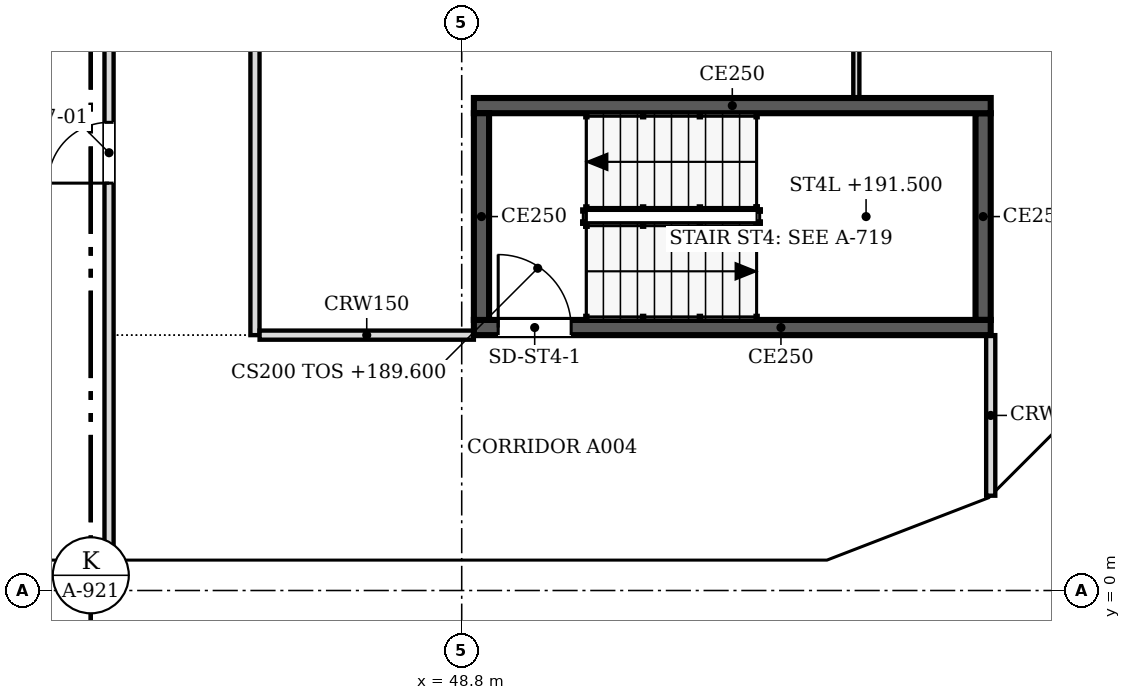
"""IFC4 building model, lengths in metres.
Left out: names, types, materials, properties, quantities, classifications, styles, units other than length and angle.
Written with IfcOpenShell. Run it as: python <this file> out.ifc"""

import sys

from ifc_helpers import new_model, si_unit, direction, frame, frame_2d, origin, place, context, subcontext, project, spatial, polyline, rectangle, outline, extrude, faceted_brep, source, transform, mapped, element, fill, save


model = new_model("IFC4")
c1 = context("Model", 3, precision=1e-05, world=origin(), true_north=direction((0.0, 1.0)))
c2 = subcontext(c1, "Body", "Model", "MODEL_VIEW")
j1 = project(units=[si_unit("LENGTHUNIT", "METRE"), si_unit("PLANEANGLEUNIT", "RADIAN")], contexts=[c1])
p1 = place(None, origin())
s1 = spatial("IfcSite", under=j1, at=p1, CompositionType="ELEMENT")
p2 = place(p1, origin())
s2 = spatial("IfcBuilding", under=s1, at=p2, CompositionType="ELEMENT")
p3 = place(p2, frame((0.0, 0.0, 189.6)))
s3 = spatial("IfcBuildingStorey", under=s2, at=p3, CompositionType="ELEMENT", Elevation=189.6)
m1 = source(origin(), c2, "Body", "Brep", [
    faceted_brep([(3.05, -0.25, 0.0), (6.1, -0.25, 3.8), (6.1, -0.25, 3.8), (3.05, -0.25, 7.6), (0.0, -0.25, 3.8), (0.0, 0.25, 3.8), (3.05, 0.25, 7.6), (6.1, 0.25, 3.8), (6.1, 0.25, 3.8), (3.05, 0.25, 0.0)], [[[0, 1, 2, 3, 4]], [[5, 6, 7, 8, 9]], [[9, 8, 1, 0]], [[7, 6, 3, 2]], [[6, 5, 4, 3]], [[5, 9, 0, 4]], [[1, 8, 7, 2]]]),
])
p4 = place(p3, frame((36.6, 0.25, -3.8), z_axis=(0.0, 0.0, 1.0), x_axis=(1.0, 0.0, 0.0)))
e1 = element("IfcWall", 1, at=p4, inside=s3, PredefinedType="SOLIDWALL", context=c2, shape_type="MappedRepresentation", body=[
    mapped(m1, transform((0.0, 0.0, 0.0), scale=1.0)),
])
m2 = source(origin(), c2, "Body", "SweptSolid", [
    extrude(outline(polyline([(3.05, 0.399), (5.78, 3.8), (3.05, 7.2), (0.321, 3.8), (3.05, 0.399)])), frame((0.0, 0.26, 0.0), z_axis=(0.0, -1.0, 0.0), x_axis=(1.0, 0.0, 0.0)), (0.0, 0.0, 1.0), 0.52),
])
p5 = place(p4, origin())
e2 = element("IfcOpeningElement", 2, at=p5, cuts=e1, PredefinedType="OPENING", context=c2, shape_type="MappedRepresentation", body=[
    mapped(m2, transform((0.0, 0.0, 0.0), scale=1.0)),
])
m3 = source(origin(), c2, "Body", "SweptSolid", [
    extrude(outline(polyline([(3.05, 0.0), (6.1, 3.8), (3.05, 7.6), (0.0, 3.8), (3.05, 0.0)])), frame((0.0, 0.25, 0.0), z_axis=(0.0, -1.0, 0.0), x_axis=(1.0, 0.0, 0.0)), (0.0, 0.0, 1.0), 0.5),
])
p6 = place(p3, frame((42.7, 0.25, -3.8), z_axis=(0.0, 0.0, 1.0), x_axis=(1.0, 0.0, 0.0)))
e3 = element("IfcWall", 3, at=p6, inside=s3, PredefinedType="SOLIDWALL", context=c2, shape_type="MappedRepresentation", body=[
    mapped(m3, transform((0.0, 0.0, 0.0), scale=1.0)),
])
p7 = place(p6, origin())
e4 = element("IfcOpeningElement", 4, at=p7, cuts=e3, PredefinedType="OPENING", context=c2, shape_type="MappedRepresentation", body=[
    mapped(m2, transform((0.0, 0.0, 0.0), scale=1.0)),
])
m4 = source(origin(), c2, "Body", "Brep", [
    faceted_brep([(3.05, -0.25, 0.0), (6.053, -0.25, 3.8), (3.05, -0.25, 7.6), (0.0, -0.25, 3.8), (0.0, 0.25, 3.8), (3.05, 0.25, 7.6), (6.007, 0.25, 3.859), (6.007, 0.25, 3.741), (3.05, 0.25, 0.0), (6.053, 0.0, 3.8)], [[[0, 1, 2, 3]], [[4, 5, 6, 7, 8]], [[8, 7, 9, 1, 0]], [[6, 5, 2, 1, 9]], [[5, 4, 3, 2]], [[4, 8, 0, 3]], [[7, 6, 9]]]),
])
p8 = place(p3, frame((48.8, 0.25, -3.8), z_axis=(0.0, 0.0, 1.0), x_axis=(1.0, 0.0, 0.0)))
e5 = element("IfcWall", 5, at=p8, inside=s3, PredefinedType="SOLIDWALL", context=c2, shape_type="MappedRepresentation", body=[
    mapped(m4, transform((0.0, 0.0, 0.0), scale=1.0)),
])
m5 = source(origin(), c2, "Body", "SweptSolid", [
    extrude(outline(polyline([(3.049, 0.401), (5.735, 3.8), (3.049, 7.199), (0.321, 3.8), (3.049, 0.401)])), frame((0.0, 0.26, 0.0), z_axis=(0.0, -1.0, 0.0), x_axis=(1.0, 0.0, 0.0)), (0.0, 0.0, 1.0), 0.52),
])
p9 = place(p8, origin())
e6 = element("IfcOpeningElement", 6, at=p9, cuts=e5, PredefinedType="OPENING", context=c2, shape_type="MappedRepresentation", body=[
    mapped(m5, transform((0.0, 0.0, 0.0), scale=1.0)),
])
m6 = source(origin(), c2, "Body", "Brep", [
    faceted_brep([(2.95, -0.25, 0.0), (3.003, -0.25, 0.068), (3.003, -0.25, 7.531), (2.95, -0.25, 7.6), (0.0, -0.25, 3.8), (0.047, 0.25, 3.86), (2.898, 0.25, 7.532), (2.898, 0.25, 0.068), (0.047, 0.25, 3.74), (2.95, 0.0, 0.0), (2.95, 0.0, 7.6), (0.0, 0.0, 3.8)], [[[0, 1, 2, 3, 4]], [[5, 6, 7, 8]], [[1, 0, 9]], [[10, 3, 2]], [[6, 5, 11, 4, 3, 10]], [[8, 7, 9, 0, 4, 11]], [[8, 11, 5]], [[1, 9, 7, 6, 10, 2]]]),
])
p10 = place(p3, frame((54.854, 0.25, -3.8), z_axis=(0.0, 0.0, 1.0), x_axis=(0.932970071518, 0.359953949349, 0.0)))
e7 = element("IfcWall", 7, at=p10, inside=s3, PredefinedType="SOLIDWALL", context=c2, shape_type="MappedRepresentation", body=[
    mapped(m6, transform((0.0, 0.0, 0.0), scale=1.0)),
])
m7 = source(origin(), c2, "Body", "SweptSolid", [
    extrude(outline(polyline([(2.75, 6.935), (0.316, 3.8), (2.75, 0.665), (2.75, 6.935)])), frame((0.0, 0.26, 0.0), z_axis=(0.0, -1.0, 0.0), x_axis=(1.0, 0.0, 0.0)), (0.0, 0.0, 1.0), 0.52),
])
p11 = place(p10, origin())
e8 = element("IfcOpeningElement", 8, at=p11, cuts=e7, PredefinedType="OPENING", context=c2, shape_type="MappedRepresentation", body=[
    mapped(m7, transform((0.0, 0.0, 0.0), scale=1.0)),
])
m8 = source(origin(), c2, "Body", "Brep", [
    faceted_brep([(0.053, -0.25, 0.0), (2.997, -0.25, 3.8), (0.053, -0.25, 7.6), (0.0, -0.25, 7.532), (0.0, -0.25, 0.068), (0.106, 0.25, 7.531), (2.944, 0.25, 3.868), (2.944, 0.25, 3.732), (0.106, 0.25, 0.068), (2.997, 0.0, 3.8), (0.053, 0.0, 0.0), (0.053, 0.0, 7.6)], [[[0, 1, 2, 3, 4]], [[5, 6, 7, 8]], [[8, 7, 9, 1, 0, 10]], [[6, 5, 11, 2, 1, 9]], [[3, 2, 11]], [[10, 0, 4]], [[8, 10, 4, 3, 11, 5]], [[7, 6, 9]]]),
])
p12 = place(p3, frame((57.569, 1.274, -3.8), z_axis=(0.0, 0.0, 1.0), x_axis=(0.707066050402, 0.707147509625, 0.0)))
e9 = element("IfcWall", 9, at=p12, inside=s3, PredefinedType="SOLIDWALL", context=c2, shape_type="MappedRepresentation", body=[
    mapped(m8, transform((0.0, 0.0, 0.0), scale=1.0)),
])
m9 = source(origin(), c2, "Body", "SweptSolid", [
    extrude(outline(polyline([(0.253, 0.666), (2.681, 3.8), (0.253, 6.934), (0.253, 0.666)])), frame((0.0, 0.26, 0.0), z_axis=(0.0, -1.0, 0.0), x_axis=(1.0, 0.0, 0.0)), (0.0, 0.0, 1.0), 0.52),
])
p13 = place(p12, origin())
e10 = element("IfcOpeningElement", 10, at=p13, cuts=e9, PredefinedType="OPENING", context=c2, shape_type="MappedRepresentation", body=[
    mapped(m9, transform((0.0, 0.0, 0.0), scale=1.0)),
])
m10 = source(origin(), c2, "Body", "SweptSolid", [
    extrude(outline(polyline([(3.05, 0.0), (6.1, 3.8), (0.0, 3.8), (3.05, 0.0)])), frame((0.0, 0.25, 0.0), z_axis=(0.0, -1.0, 0.0), x_axis=(1.0, 0.0, 0.0)), (0.0, 0.0, 1.0), 0.5),
])
p14 = place(p3, frame((39.65, 0.25, 0.0), z_axis=(0.0, 0.0, 1.0), x_axis=(1.0, 0.0, 0.0)))
e11 = element("IfcWall", 11, at=p14, inside=s3, PredefinedType="SOLIDWALL", context=c2, shape_type="MappedRepresentation", body=[
    mapped(m10, transform((0.0, 0.0, 0.0), scale=1.0)),
])
m11 = source(origin(), c2, "Body", "SweptSolid", [
    extrude(outline(polyline([(3.05, 0.399), (5.579, 3.55), (0.521, 3.55), (3.05, 0.399)])), frame((0.0, 0.26, 0.0), z_axis=(0.0, -1.0, 0.0), x_axis=(1.0, 0.0, 0.0)), (0.0, 0.0, 1.0), 0.52),
])
p15 = place(p14, origin())
e12 = element("IfcOpeningElement", 12, at=p15, cuts=e11, PredefinedType="OPENING", context=c2, shape_type="MappedRepresentation", body=[
    mapped(m11, transform((0.0, 0.0, 0.0), scale=1.0)),
])
p16 = place(p3, frame((45.75, 0.25, 0.0), z_axis=(0.0, 0.0, 1.0), x_axis=(1.0, 0.0, 0.0)))
e13 = element("IfcWall", 13, at=p16, inside=s3, PredefinedType="SOLIDWALL", context=c2, shape_type="MappedRepresentation", body=[
    mapped(m10, transform((0.0, 0.0, 0.0), scale=1.0)),
])
p17 = place(p16, origin())
e14 = element("IfcOpeningElement", 14, at=p17, cuts=e13, PredefinedType="OPENING", context=c2, shape_type="MappedRepresentation", body=[
    mapped(m11, transform((0.0, 0.0, 0.0), scale=1.0)),
])
m12 = source(origin(), c2, "Body", "Brep", [
    faceted_brep([(3.003, -0.25, 0.0), (3.05, -0.25, 0.06), (3.05, -0.25, 3.8), (0.0, -0.25, 3.8), (0.0, 0.25, 3.8), (2.957, 0.25, 3.8), (2.957, 0.25, 0.059), (3.003, 0.0, 0.0)], [[[0, 1, 2, 3]], [[4, 5, 6]], [[1, 0, 7]], [[5, 4, 3, 2]], [[4, 6, 7, 0, 3]], [[1, 7, 6, 5, 2]]]),
])
p18 = place(p3, frame((51.85, 0.25, 0.0), z_axis=(0.0, 0.0, 1.0), x_axis=(1.0, 0.0, 0.0)))
e15 = element("IfcWall", 15, at=p18, inside=s3, PredefinedType="SOLIDWALL", context=c2, shape_type="MappedRepresentation", body=[
    mapped(m12, transform((0.0, 0.0, 0.0), scale=1.0)),
])
m13 = source(origin(), c2, "Body", "SweptSolid", [
    extrude(outline(polyline([(2.803, 3.55), (0.516, 3.55), (2.803, 0.656), (2.803, 3.55)])), frame((0.0, 0.26, 0.0), z_axis=(0.0, -1.0, 0.0), x_axis=(1.0, 0.0, 0.0)), (0.0, 0.0, 1.0), 0.52),
])
p19 = place(p18, origin())
e16 = element("IfcOpeningElement", 16, at=p19, cuts=e15, PredefinedType="OPENING", context=c2, shape_type="MappedRepresentation", body=[
    mapped(m13, transform((0.0, 0.0, 0.0), scale=1.0)),
])
m14 = source(origin(), c2, "Body", "Brep", [
    faceted_brep([(0.047, -0.25, 0.0), (2.997, -0.25, 3.8), (0.0, -0.25, 3.8), (0.0, -0.25, 0.059), (0.093, 0.25, 3.8), (2.944, 0.25, 3.8), (2.944, 0.25, 3.732), (0.093, 0.25, 0.06), (2.997, 0.0, 3.8), (0.047, 0.0, 0.0)], [[[0, 1, 2, 3]], [[4, 5, 6, 7]], [[7, 6, 8, 1, 0, 9]], [[5, 4, 2, 1, 8]], [[9, 0, 3]], [[7, 9, 3, 2, 4]], [[6, 5, 8]]]),
])
p20 = place(p3, frame((54.81, 0.233, 0.0), z_axis=(0.0, 0.0, 1.0), x_axis=(0.932990326376, 0.359901446078, 0.0)))
e17 = element("IfcWall", 17, at=p20, inside=s3, PredefinedType="SOLIDWALL", context=c2, shape_type="MappedRepresentation", body=[
    mapped(m14, transform((0.0, 0.0, 0.0), scale=1.0)),
])
m15 = source(origin(), c2, "Body", "SweptSolid", [
    extrude(outline(polyline([(0.247, 0.665), (2.487, 3.55), (0.247, 3.55), (0.247, 0.665)])), frame((0.0, 0.26, 0.0), z_axis=(0.0, -1.0, 0.0), x_axis=(1.0, 0.0, 0.0)), (0.0, 0.0, 1.0), 0.52),
])
p21 = place(p20, origin())
e18 = element("IfcOpeningElement", 18, at=p21, cuts=e17, PredefinedType="OPENING", context=c2, shape_type="MappedRepresentation", body=[
    mapped(m15, transform((0.0, 0.0, 0.0), scale=1.0)),
])
m16 = source(origin(), c2, "Body", "Brep", [
    faceted_brep([(2.944, -0.25, 0.0), (2.997, -0.25, 0.068), (2.997, -0.25, 3.8), (0.0, -0.25, 3.8), (0.053, 0.25, 3.8), (2.891, 0.25, 3.8), (2.891, 0.25, 0.068), (0.053, 0.25, 3.731), (2.944, 0.0, 0.0), (0.0, 0.0, 3.8)], [[[0, 1, 2, 3]], [[4, 5, 6, 7]], [[1, 0, 8]], [[5, 4, 9, 3, 2]], [[7, 6, 8, 0, 3, 9]], [[7, 9, 4]], [[1, 8, 6, 5, 2]]]),
])
p22 = place(p3, frame((57.606, 1.312, 0.0), z_axis=(0.0, 0.0, 1.0), x_axis=(0.707147509625, 0.707066050402, 0.0)))
e19 = element("IfcWall", 19, at=p22, inside=s3, PredefinedType="SOLIDWALL", context=c2, shape_type="MappedRepresentation", body=[
    mapped(m16, transform((0.0, 0.0, 0.0), scale=1.0)),
])
m17 = source(origin(), c2, "Body", "SweptSolid", [
    extrude(outline(polyline([(2.744, 3.55), (0.51, 3.55), (2.744, 0.666), (2.744, 3.55)])), frame((0.0, 0.26, 0.0), z_axis=(0.0, -1.0, 0.0), x_axis=(1.0, 0.0, 0.0)), (0.0, 0.0, 1.0), 0.52),
])
p23 = place(p22, origin())
e20 = element("IfcOpeningElement", 20, at=p23, cuts=e19, PredefinedType="OPENING", context=c2, shape_type="MappedRepresentation", body=[
    mapped(m17, transform((0.0, 0.0, 0.0), scale=1.0)),
])
p24 = place(p3, frame((57.5, 4.325, 0.0), z_axis=(0.0, 0.0, 1.0), x_axis=(-1.0, 0.0, 0.0)))
e21 = element("IfcWall", 21, at=p24, inside=s3, PredefinedType="SOLIDWALL", context=c2, shape_type="SweptSolid", body=[
    extrude(rectangle(XDim=8.5, YDim=0.25, at=frame_2d((4.25, 0.0))), origin(), (0.0, 0.0, 1.0), 3.8),
])
m18 = source(origin(), c2, "Body", "SweptSolid", [
    extrude(rectangle(XDim=1.2, YDim=2.1, at=frame_2d((0.6, 1.05))), frame((0.0, 0.135, 0.0), z_axis=(0.0, -1.0, 0.0), x_axis=(1.0, 0.0, 0.0)), (0.0, 0.0, 1.0), 0.27),
])
p25 = place(p24, frame((6.9, 0.0, 0.0)))
e22 = element("IfcOpeningElement", 22, at=p25, cuts=e21, PredefinedType="OPENING", context=c2, shape_type="MappedRepresentation", body=[
    mapped(m18, transform((0.0, 0.0, 0.0), scale=1.0)),
])
p26 = place(p3, frame((49.125, 4.45, 0.0), z_axis=(0.0, 0.0, 1.0), x_axis=(0.0, 1.0, 0.0)))
e23 = element("IfcWall", 23, at=p26, inside=s3, PredefinedType="SOLIDWALL", context=c2, shape_type="SweptSolid", body=[
    extrude(rectangle(XDim=3.4, YDim=0.25, at=frame_2d((1.7, 0.0))), origin(), (0.0, 0.0, 1.0), 3.8),
])
p27 = place(p3, frame((49.0, 7.975, 0.0), z_axis=(0.0, 0.0, 1.0), x_axis=(1.0, 0.0, 0.0)))
e24 = element("IfcWall", 24, at=p27, inside=s3, PredefinedType="SOLIDWALL", context=c2, shape_type="SweptSolid", body=[
    extrude(rectangle(XDim=8.5, YDim=0.25, at=frame_2d((4.25, 0.0))), origin(), (0.0, 0.0, 1.0), 3.8),
])
p28 = place(p3, frame((57.375, 7.85, 0.0), z_axis=(0.0, 0.0, 1.0), x_axis=(0.0, -1.0, 0.0)))
e25 = element("IfcWall", 25, at=p28, inside=s3, PredefinedType="SOLIDWALL", context=c2, shape_type="SweptSolid", body=[
    extrude(rectangle(XDim=3.4, YDim=0.25, at=frame_2d((1.7, 0.0))), origin(), (0.0, 0.0, 1.0), 3.8),
])
p29 = place(p3, frame((43.0, 0.5, 0.0), z_axis=(0.0, 0.0, 1.0), x_axis=(0.0, 1.0, 0.0)))
e26 = element("IfcWall", 26, at=p29, inside=s3, PredefinedType="PARTITIONING", context=c2, shape_type="SweptSolid", body=[
    extrude(rectangle(XDim=21.424, YDim=0.15, at=frame_2d((10.712, 0.0))), origin(), (0.0, 0.0, 1.0), 2.947),
])
m19 = source(origin(), c2, "Body", "SweptSolid", [
    extrude(rectangle(XDim=1.0, YDim=2.1, at=frame_2d((0.5, 1.05))), frame((0.0, 0.085, 0.0), z_axis=(0.0, -1.0, 0.0), x_axis=(1.0, 0.0, 0.0)), (0.0, 0.0, 1.0), 0.17),
])
p30 = place(p29, frame((6.2, 0.0, 0.0)))
e27 = element("IfcOpeningElement", 27, at=p30, cuts=e26, PredefinedType="OPENING", context=c2, shape_type="MappedRepresentation", body=[
    mapped(m19, transform((0.0, 0.0, 0.0), scale=1.0)),
])
p31 = place(p29, frame((15.1, 0.0, 0.0)))
e28 = element("IfcOpeningElement", 28, at=p31, cuts=e26, PredefinedType="OPENING", context=c2, shape_type="MappedRepresentation", body=[
    mapped(m19, transform((0.0, 0.0, 0.0), scale=1.0)),
])
p32 = place(p3, frame((57.5, 1.559, 0.0), z_axis=(0.0, 0.0, 1.0), x_axis=(0.0, 1.0, 0.0)))
e29 = element("IfcWall", 29, at=p32, inside=s3, PredefinedType="PARTITIONING", context=c2, shape_type="SweptSolid", body=[
    extrude(rectangle(XDim=2.641, YDim=0.15, at=frame_2d((1.32, 0.0))), origin(), (0.0, 0.0, 1.0), 2.947),
])
p33 = place(p3, frame((45.4, 21.924, 0.0), z_axis=(0.0, 0.0, 1.0), x_axis=(0.0, -1.0, 0.0)))
e30 = element("IfcWall", 30, at=p33, inside=s3, PredefinedType="PARTITIONING", context=c2, shape_type="SweptSolid", body=[
    extrude(rectangle(XDim=17.724, YDim=0.15, at=frame_2d((8.862, 0.0))), origin(), (0.0, 0.0, 1.0), 2.947),
])
m20 = source(origin(), c2, "Body", "SweptSolid", [
    extrude(rectangle(XDim=0.9, YDim=2.1, at=frame_2d((0.45, 1.05))), frame((0.0, 0.085, 0.0), z_axis=(0.0, -1.0, 0.0), x_axis=(1.0, 0.0, 0.0)), (0.0, 0.0, 1.0), 0.17),
])
p34 = place(p33, frame((1.923, 0.0, 0.0)))
e31 = element("IfcOpeningElement", 31, at=p34, cuts=e30, PredefinedType="OPENING", context=c2, shape_type="MappedRepresentation", body=[
    mapped(m20, transform((0.0, 0.0, 0.0), scale=1.0)),
])
p35 = place(p33, frame((10.824, 0.0, 0.0)))
e32 = element("IfcOpeningElement", 32, at=p35, cuts=e30, PredefinedType="OPENING", context=c2, shape_type="MappedRepresentation", body=[
    mapped(m20, transform((0.0, 0.0, 0.0), scale=1.0)),
])
p36 = place(p3, frame((45.476, 4.2, 0.0), z_axis=(0.0, 0.0, 1.0), x_axis=(1.0, 0.0, 0.0)))
e33 = element("IfcWall", 33, at=p36, inside=s3, PredefinedType="PARTITIONING", context=c2, shape_type="SweptSolid", body=[
    extrude(rectangle(XDim=3.524, YDim=0.15, at=frame_2d((1.762, 0.0))), origin(), (0.0, 0.0, 1.0), 2.947),
])
p37 = place(p3, frame((55.29, 12.397, 0.0), z_axis=(0.0, 0.0, 1.0), x_axis=(0.0, -1.0, 0.0)))
e34 = element("IfcWall", 34, at=p37, inside=s3, PredefinedType="PARTITIONING", context=c2, shape_type="SweptSolid", body=[
    extrude(rectangle(XDim=4.297, YDim=0.1, at=frame_2d((2.148, 0.0))), origin(), (0.0, 0.0, 1.0), 2.947),
])
m21 = source(origin(), c2, "Body", "SweptSolid", [
    extrude(rectangle(XDim=0.9, YDim=2.1, at=frame_2d((0.45, 1.05))), frame((0.0, 0.06, 0.0), z_axis=(0.0, -1.0, 0.0), x_axis=(1.0, 0.0, 0.0)), (0.0, 0.0, 1.0), 0.12),
])
p38 = place(p37, frame((1.697, 0.0, 0.0)))
e35 = element("IfcOpeningElement", 35, at=p38, cuts=e34, PredefinedType="OPENING", context=c2, shape_type="MappedRepresentation", body=[
    mapped(m21, transform((0.0, 0.0, 0.0), scale=1.0)),
])
m22 = source(origin(), c2, "Body", "SweptSolid", [
    extrude(rectangle(XDim=1.2, YDim=2.1, at=frame_2d((0.6, 1.05))), frame((0.0, 0.025, 0.0), z_axis=(0.0, -1.0, 0.0), x_axis=(1.0, 0.0, 0.0)), (0.0, 0.0, 1.0), 0.05),
])
p39 = place(p25, origin())
e36 = element("IfcDoor", 36, at=p39, inside=s3, OperationType="SINGLE_SWING_RIGHT", PredefinedType="DOOR", context=c2, shape_type="MappedRepresentation", body=[
    mapped(m22, transform((0.0, 0.0, 0.0), scale=1.0)),
])
fill(e22, e36)
m23 = source(origin(), c2, "Body", "SweptSolid", [
    extrude(rectangle(XDim=1.0, YDim=2.1, at=frame_2d((0.5, 1.05))), frame((0.0, 0.025, 0.0), z_axis=(0.0, -1.0, 0.0), x_axis=(1.0, 0.0, 0.0)), (0.0, 0.0, 1.0), 0.05),
])
p40 = place(p30, origin())
e37 = element("IfcDoor", 37, at=p40, inside=s3, OperationType="SINGLE_SWING_LEFT", PredefinedType="DOOR", context=c2, shape_type="MappedRepresentation", body=[
    mapped(m23, transform((0.0, 0.0, 0.0), scale=1.0)),
])
fill(e27, e37)
save(model, sys.argv[1])
